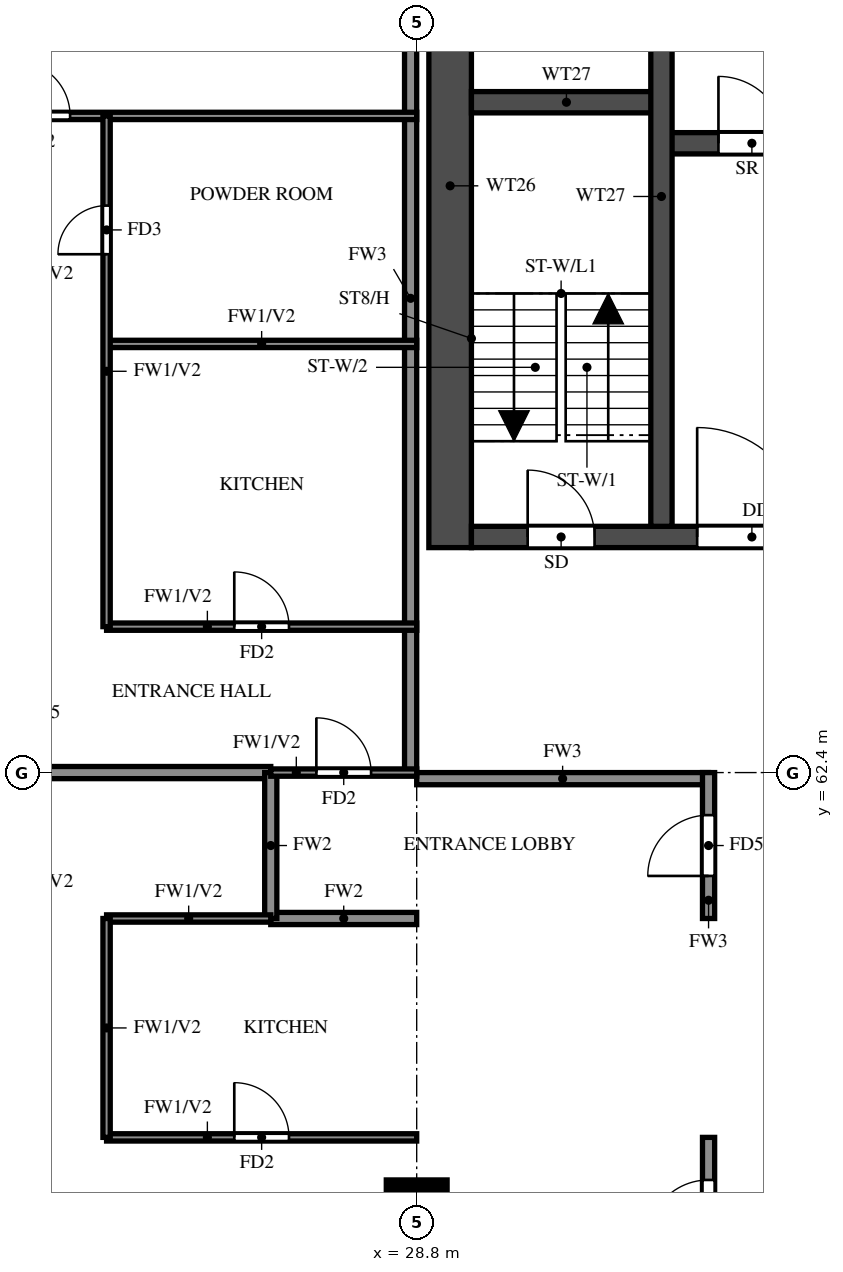
"""IFC4 building model, lengths in metres.
Left out: names, types, materials, properties, quantities, classifications, styles, units other than length and angle.
Written with IfcOpenShell. Run it as: python <this file> out.ifc"""

import sys

from ifc_helpers import new_model, si_unit, direction, frame, frame_2d, origin, origin_2d, place, context, subcontext, project, spatial, rectangle, extrude, source, transform, mapped, element, fill, save


model = new_model("IFC4")
c1 = context("Model", 3, precision=1e-05, world=origin(), true_north=direction((0.0, 1.0)))
c2 = subcontext(c1, "Body", "Model", "MODEL_VIEW")
j1 = project(units=[si_unit("LENGTHUNIT", "METRE"), si_unit("PLANEANGLEUNIT", "RADIAN")], contexts=[c1])
p1 = place(None, origin())
s1 = spatial("IfcSite", under=j1, at=p1, CompositionType="ELEMENT")
p2 = place(p1, origin())
s2 = spatial("IfcBuilding", under=s1, at=p2, CompositionType="ELEMENT")
p3 = place(p2, frame((0.0, 0.0, 164.0)))
s3 = spatial("IfcBuildingStorey", under=s2, at=p3, CompositionType="ELEMENT", Elevation=164.0)
m1 = source(origin(), c2, "Body", "SweptSolid", [
    extrude(rectangle(XDim=1.0, YDim=1.0, at=origin_2d()), origin(), (0.0, 0.0, 1.0), 3.2),
])
p4 = place(p3, frame((28.8, 55.2, 0.0), z_axis=(0.0, 0.0, 1.0), x_axis=(1.0, 0.0, 0.0)))
e1 = element("IfcColumn", 1, at=p4, inside=s3, PredefinedType="COLUMN", context=c2, shape_type="MappedRepresentation", body=[
    mapped(m1, transform((0.0, 0.0, 0.0))),
])
p5 = place(p3, frame((29.35, 66.1, 0.0), z_axis=(0.0, 0.0, 1.0), x_axis=(0.0, 1.0, 0.0)))
e2 = element("IfcWall", 2, at=p5, inside=s3, PredefinedType="SHEAR", context=c2, shape_type="SweptSolid", body=[
    extrude(rectangle(XDim=11.9, YDim=0.7, at=frame_2d((5.95, 0.0))), origin(), (0.0, 0.0, 1.0), 3.2),
])
p6 = place(p3, frame((29.7, 66.275, 0.0), z_axis=(0.0, 0.0, 1.0), x_axis=(1.0, 0.0, 0.0)))
e3 = element("IfcWall", 3, at=p6, inside=s3, PredefinedType="SHEAR", context=c2, shape_type="SweptSolid", body=[
    extrude(rectangle(XDim=41.4, YDim=0.35, at=frame_2d((20.7, 0.0))), origin(), (0.0, 0.0, 1.0), 3.2),
])
p7 = place(p6, frame((0.925, 0.0, 0.0)))
e4 = element("IfcOpeningElement", 4, at=p7, cuts=e3, PredefinedType="OPENING", context=c2, shape_type="SweptSolid", body=[
    extrude(rectangle(XDim=1.1, YDim=2.1, at=frame_2d((0.55, 1.05))), frame((0.0, 0.185, 0.0), z_axis=(0.0, -1.0, 0.0), x_axis=(1.0, 0.0, 0.0)), (0.0, 0.0, 1.0), 0.37),
])
p8 = place(p6, frame((3.712, 0.0, 0.0)))
e5 = element("IfcOpeningElement", 5, at=p8, cuts=e3, PredefinedType="OPENING", context=c2, shape_type="SweptSolid", body=[
    extrude(rectangle(XDim=1.8, YDim=2.1, at=frame_2d((0.9, 1.05))), frame((0.0, 0.185, 0.0), z_axis=(0.0, -1.0, 0.0), x_axis=(1.0, 0.0, 0.0)), (0.0, 0.0, 1.0), 0.37),
])
p9 = place(p3, frame((32.825, 72.75, 0.0), z_axis=(0.0, 0.0, 1.0), x_axis=(1.0, 0.0, 0.0)))
e6 = element("IfcWall", 6, at=p9, inside=s3, PredefinedType="SHEAR", context=c2, shape_type="SweptSolid", body=[
    extrude(rectangle(XDim=35.15, YDim=0.35, at=frame_2d((17.575, 0.0))), origin(), (0.0, 0.0, 1.0), 3.2),
])
p10 = place(p9, frame((19.8, 0.0, 0.0)))
e7 = element("IfcOpeningElement", 7, at=p10, cuts=e6, PredefinedType="OPENING", context=c2, shape_type="SweptSolid", body=[
    extrude(rectangle(XDim=1.1, YDim=2.1, at=frame_2d((0.55, 1.05))), frame((0.0, 0.185, 0.0), z_axis=(0.0, -1.0, 0.0), x_axis=(1.0, 0.0, 0.0)), (0.0, 0.0, 1.0), 0.37),
])
p11 = place(p9, frame((27.7, 0.0, 0.0)))
e8 = element("IfcOpeningElement", 8, at=p11, cuts=e6, PredefinedType="OPENING", context=c2, shape_type="SweptSolid", body=[
    extrude(rectangle(XDim=1.1, YDim=2.1, at=frame_2d((0.55, 1.05))), frame((0.0, 0.185, 0.0), z_axis=(0.0, -1.0, 0.0), x_axis=(1.0, 0.0, 0.0)), (0.0, 0.0, 1.0), 0.37),
])
p12 = place(p9, frame((30.3, 0.0, 0.0)))
e9 = element("IfcOpeningElement", 9, at=p12, cuts=e6, PredefinedType="OPENING", context=c2, shape_type="SweptSolid", body=[
    extrude(rectangle(XDim=1.1, YDim=2.1, at=frame_2d((0.55, 1.05))), frame((0.0, 0.185, 0.0), z_axis=(0.0, -1.0, 0.0), x_axis=(1.0, 0.0, 0.0)), (0.0, 0.0, 1.0), 0.37),
])
p13 = place(p9, frame((3.8, 0.0, 0.0)))
e10 = element("IfcOpeningElement", 10, at=p13, cuts=e6, PredefinedType="OPENING", context=c2, shape_type="SweptSolid", body=[
    extrude(rectangle(XDim=1.1, YDim=2.1, at=frame_2d((0.55, 1.05))), frame((0.0, 0.185, 0.0), z_axis=(0.0, -1.0, 0.0), x_axis=(1.0, 0.0, 0.0)), (0.0, 0.0, 1.0), 0.37),
])
p14 = place(p9, frame((6.55, 0.0, 0.0)))
e11 = element("IfcOpeningElement", 11, at=p14, cuts=e6, PredefinedType="OPENING", context=c2, shape_type="SweptSolid", body=[
    extrude(rectangle(XDim=1.1, YDim=2.1, at=frame_2d((0.55, 1.05))), frame((0.0, 0.185, 0.0), z_axis=(0.0, -1.0, 0.0), x_axis=(1.0, 0.0, 0.0)), (0.0, 0.0, 1.0), 0.37),
])
p15 = place(p9, frame((9.3, 0.0, 0.0)))
e12 = element("IfcOpeningElement", 12, at=p15, cuts=e6, PredefinedType="OPENING", context=c2, shape_type="SweptSolid", body=[
    extrude(rectangle(XDim=1.1, YDim=2.1, at=frame_2d((0.55, 1.05))), frame((0.0, 0.185, 0.0), z_axis=(0.0, -1.0, 0.0), x_axis=(1.0, 0.0, 0.0)), (0.0, 0.0, 1.0), 0.37),
])
p16 = place(p9, frame((12.05, 0.0, 0.0)))
e13 = element("IfcOpeningElement", 13, at=p16, cuts=e6, PredefinedType="OPENING", context=c2, shape_type="SweptSolid", body=[
    extrude(rectangle(XDim=1.1, YDim=2.1, at=frame_2d((0.55, 1.05))), frame((0.0, 0.185, 0.0), z_axis=(0.0, -1.0, 0.0), x_axis=(1.0, 0.0, 0.0)), (0.0, 0.0, 1.0), 0.37),
])
p17 = place(p9, frame((14.8, 0.0, 0.0)))
e14 = element("IfcOpeningElement", 14, at=p17, cuts=e6, PredefinedType="OPENING", context=c2, shape_type="SweptSolid", body=[
    extrude(rectangle(XDim=1.1, YDim=2.1, at=frame_2d((0.55, 1.05))), frame((0.0, 0.185, 0.0), z_axis=(0.0, -1.0, 0.0), x_axis=(1.0, 0.0, 0.0)), (0.0, 0.0, 1.0), 0.37),
])
p18 = place(p9, frame((17.55, 0.0, 0.0)))
e15 = element("IfcOpeningElement", 15, at=p18, cuts=e6, PredefinedType="OPENING", context=c2, shape_type="SweptSolid", body=[
    extrude(rectangle(XDim=1.1, YDim=2.1, at=frame_2d((0.55, 1.05))), frame((0.0, 0.185, 0.0), z_axis=(0.0, -1.0, 0.0), x_axis=(1.0, 0.0, 0.0)), (0.0, 0.0, 1.0), 0.37),
])
p19 = place(p9, frame((0.938, 0.0, 0.0)))
e16 = element("IfcOpeningElement", 16, at=p19, cuts=e6, PredefinedType="OPENING", context=c2, shape_type="SweptSolid", body=[
    extrude(rectangle(XDim=1.1, YDim=2.1, at=frame_2d((0.55, 1.05))), frame((0.0, 0.185, 0.0), z_axis=(0.0, -1.0, 0.0), x_axis=(1.0, 0.0, 0.0)), (0.0, 0.0, 1.0), 0.37),
])
p20 = place(p3, frame((29.7, 73.425, 0.0), z_axis=(0.0, 0.0, 1.0), x_axis=(1.0, 0.0, 0.0)))
e17 = element("IfcWall", 17, at=p20, inside=s3, PredefinedType="SHEAR", context=c2, shape_type="SweptSolid", body=[
    extrude(rectangle(XDim=3.125, YDim=0.35, at=frame_2d((1.562, 0.0))), origin(), (0.0, 0.0, 1.0), 3.2),
])
p21 = place(p3, frame((32.825, 66.45, 0.0), z_axis=(0.0, 0.0, 1.0), x_axis=(0.0, 1.0, 0.0)))
e18 = element("IfcWall", 18, at=p21, inside=s3, PredefinedType="SHEAR", context=c2, shape_type="SweptSolid", body=[
    extrude(rectangle(XDim=10.85, YDim=0.35, at=frame_2d((5.425, 0.0))), origin(), (0.0, 0.0, 1.0), 3.2),
])
p22 = place(p3, frame((28.8, 62.3, 0.0), z_axis=(0.0, 0.0, 1.0), x_axis=(1.0, 0.0, 0.0)))
e19 = element("IfcWall", 19, at=p22, inside=s3, PredefinedType="SOLIDWALL", context=c2, shape_type="SweptSolid", body=[
    extrude(rectangle(XDim=4.8, YDim=0.2, at=frame_2d((2.4, 0.0))), origin(), (0.0, 0.0, 1.0), 3.2),
])
p23 = place(p3, frame((28.7, 62.4, 0.0), z_axis=(0.0, 0.0, 1.0), x_axis=(0.0, 1.0, 0.0)))
e20 = element("IfcWall", 20, at=p23, inside=s3, PredefinedType="SOLIDWALL", context=c2, shape_type="SweptSolid", body=[
    extrude(rectangle(XDim=15.6, YDim=0.2, at=frame_2d((7.8, 0.0))), origin(), (0.0, 0.0, 1.0), 3.2),
])
p24 = place(p3, frame((33.6, 45.6, 0.0), z_axis=(0.0, 0.0, 1.0), x_axis=(0.0, 1.0, 0.0)))
e21 = element("IfcWall", 21, at=p24, inside=s3, PredefinedType="SOLIDWALL", context=c2, shape_type="SweptSolid", body=[
    extrude(rectangle(XDim=10.8, YDim=0.2, at=frame_2d((5.4, 0.0))), origin(), (0.0, 0.0, 1.0), 3.2),
])
p25 = place(p24, frame((0.7, 0.0, 0.0)))
e22 = element("IfcOpeningElement", 22, at=p25, cuts=e21, PredefinedType="OPENING", context=c2, shape_type="SweptSolid", body=[
    extrude(rectangle(XDim=1.0, YDim=2.1, at=frame_2d((0.5, 1.05))), frame((0.0, 0.11, 0.0), z_axis=(0.0, -1.0, 0.0), x_axis=(1.0, 0.0, 0.0)), (0.0, 0.0, 1.0), 0.22),
])
p26 = place(p24, frame((9.1, 0.0, 0.0)))
e23 = element("IfcOpeningElement", 23, at=p26, cuts=e21, PredefinedType="OPENING", context=c2, shape_type="SweptSolid", body=[
    extrude(rectangle(XDim=1.0, YDim=2.1, at=frame_2d((0.5, 1.05))), frame((0.0, 0.11, 0.0), z_axis=(0.0, -1.0, 0.0), x_axis=(1.0, 0.0, 0.0)), (0.0, 0.0, 1.0), 0.22),
])
p27 = place(p3, frame((33.6, 60.0, 0.0), z_axis=(0.0, 0.0, 1.0), x_axis=(0.0, 1.0, 0.0)))
e24 = element("IfcWall", 24, at=p27, inside=s3, PredefinedType="SOLIDWALL", context=c2, shape_type="SweptSolid", body=[
    extrude(rectangle(XDim=2.4, YDim=0.2, at=frame_2d((1.2, 0.0))), origin(), (0.0, 0.0, 1.0), 3.2),
])
p28 = place(p27, frame((0.7, 0.0, 0.0)))
e25 = element("IfcOpeningElement", 25, at=p28, cuts=e24, PredefinedType="OPENING", context=c2, shape_type="SweptSolid", body=[
    extrude(rectangle(XDim=1.0, YDim=2.1, at=frame_2d((0.5, 1.05))), frame((0.0, 0.11, 0.0), z_axis=(0.0, -1.0, 0.0), x_axis=(1.0, 0.0, 0.0)), (0.0, 0.0, 1.0), 0.22),
])
p29 = place(p3, frame((26.4, 60.0, 0.0), z_axis=(0.0, 0.0, 1.0), x_axis=(1.0, 0.0, 0.0)))
e26 = element("IfcWall", 26, at=p29, inside=s3, PredefinedType="SOLIDWALL", context=c2, shape_type="SweptSolid", body=[
    extrude(rectangle(XDim=2.4, YDim=0.2, at=frame_2d((1.2, 0.0))), origin(), (0.0, 0.0, 1.0), 3.2),
])
p30 = place(p3, frame((14.525, 62.4, 0.0), z_axis=(0.0, 0.0, 1.0), x_axis=(1.0, 0.0, 0.0)))
e27 = element("IfcWall", 27, at=p30, inside=s3, PredefinedType="SOLIDWALL", context=c2, shape_type="SweptSolid", body=[
    extrude(rectangle(XDim=11.875, YDim=0.2, at=frame_2d((5.938, 0.0))), origin(), (0.0, 0.0, 1.0), 3.2),
])
p31 = place(p3, frame((26.4, 60.0, 0.0), z_axis=(0.0, 0.0, 1.0), x_axis=(0.0, 1.0, 0.0)))
e28 = element("IfcWall", 28, at=p31, inside=s3, PredefinedType="SOLIDWALL", context=c2, shape_type="SweptSolid", body=[
    extrude(rectangle(XDim=2.4, YDim=0.2, at=frame_2d((1.2, 0.0))), origin(), (0.0, 0.0, 1.0), 3.2),
])
p32 = place(p3, frame((23.7, 56.4, 0.0), z_axis=(0.0, 0.0, 1.0), x_axis=(1.0, 0.0, 0.0)))
e29 = element("IfcWall", 29, at=p32, inside=s3, PredefinedType="PARTITIONING", context=c2, shape_type="SweptSolid", body=[
    extrude(rectangle(XDim=5.1, YDim=0.12, at=frame_2d((2.55, 0.0))), origin(), (0.0, 0.0, 1.0), 3.2),
])
p33 = place(p32, frame((2.1, 0.0, 0.0)))
e30 = element("IfcOpeningElement", 30, at=p33, cuts=e29, PredefinedType="OPENING", context=c2, shape_type="SweptSolid", body=[
    extrude(rectangle(XDim=0.9, YDim=2.1, at=frame_2d((0.45, 1.05))), frame((0.0, 0.07, 0.0), z_axis=(0.0, -1.0, 0.0), x_axis=(1.0, 0.0, 0.0)), (0.0, 0.0, 1.0), 0.14),
])
p34 = place(p3, frame((23.7, 60.0, 0.0), z_axis=(0.0, 0.0, 1.0), x_axis=(1.0, 0.0, 0.0)))
e31 = element("IfcWall", 31, at=p34, inside=s3, PredefinedType="PARTITIONING", context=c2, shape_type="SweptSolid", body=[
    extrude(rectangle(XDim=2.7, YDim=0.12, at=frame_2d((1.35, 0.0))), origin(), (0.0, 0.0, 1.0), 3.2),
])
p35 = place(p3, frame((26.4, 62.4, 0.0), z_axis=(0.0, 0.0, 1.0), x_axis=(1.0, 0.0, 0.0)))
e32 = element("IfcWall", 32, at=p35, inside=s3, PredefinedType="PARTITIONING", context=c2, shape_type="SweptSolid", body=[
    extrude(rectangle(XDim=2.4, YDim=0.12, at=frame_2d((1.2, 0.0))), origin(), (0.0, 0.0, 1.0), 3.2),
])
p36 = place(p35, frame((0.75, 0.0, 0.0)))
e33 = element("IfcOpeningElement", 33, at=p36, cuts=e32, PredefinedType="OPENING", context=c2, shape_type="SweptSolid", body=[
    extrude(rectangle(XDim=0.9, YDim=2.1, at=frame_2d((0.45, 1.05))), frame((0.0, 0.07, 0.0), z_axis=(0.0, -1.0, 0.0), x_axis=(1.0, 0.0, 0.0)), (0.0, 0.0, 1.0), 0.14),
])
p37 = place(p3, frame((23.7, 64.8, 0.0), z_axis=(0.0, 0.0, 1.0), x_axis=(1.0, 0.0, 0.0)))
e34 = element("IfcWall", 34, at=p37, inside=s3, PredefinedType="PARTITIONING", context=c2, shape_type="SweptSolid", body=[
    extrude(rectangle(XDim=5.1, YDim=0.12, at=frame_2d((2.55, 0.0))), origin(), (0.0, 0.0, 1.0), 3.2),
])
p38 = place(p37, frame((2.1, 0.0, 0.0)))
e35 = element("IfcOpeningElement", 35, at=p38, cuts=e34, PredefinedType="OPENING", context=c2, shape_type="SweptSolid", body=[
    extrude(rectangle(XDim=0.9, YDim=2.1, at=frame_2d((0.45, 1.05))), frame((0.0, 0.07, 0.0), z_axis=(0.0, -1.0, 0.0), x_axis=(1.0, 0.0, 0.0)), (0.0, 0.0, 1.0), 0.14),
])
p39 = place(p3, frame((23.7, 69.45, 0.0), z_axis=(0.0, 0.0, 1.0), x_axis=(1.0, 0.0, 0.0)))
e36 = element("IfcWall", 36, at=p39, inside=s3, PredefinedType="PARTITIONING", context=c2, shape_type="SweptSolid", body=[
    extrude(rectangle(XDim=5.1, YDim=0.12, at=frame_2d((2.55, 0.0))), origin(), (0.0, 0.0, 1.0), 3.2),
])
p40 = place(p3, frame((14.525, 73.2, 0.0), z_axis=(0.0, 0.0, 1.0), x_axis=(1.0, 0.0, 0.0)))
e37 = element("IfcWall", 37, at=p40, inside=s3, PredefinedType="PARTITIONING", context=c2, shape_type="SweptSolid", body=[
    extrude(rectangle(XDim=14.275, YDim=0.12, at=frame_2d((7.138, 0.0))), origin(), (0.0, 0.0, 1.0), 2.3),
])
p41 = place(p40, frame((7.675, 0.0, 0.0)))
e38 = element("IfcOpeningElement", 38, at=p41, cuts=e37, PredefinedType="OPENING", context=c2, shape_type="SweptSolid", body=[
    extrude(rectangle(XDim=0.9, YDim=2.1, at=frame_2d((0.45, 1.05))), frame((0.0, 0.07, 0.0), z_axis=(0.0, -1.0, 0.0), x_axis=(1.0, 0.0, 0.0)), (0.0, 0.0, 1.0), 0.14),
])
p42 = place(p3, frame((23.7, 56.4, 0.0), z_axis=(0.0, 0.0, 1.0), x_axis=(0.0, 1.0, 0.0)))
e39 = element("IfcWall", 39, at=p42, inside=s3, PredefinedType="PARTITIONING", context=c2, shape_type="SweptSolid", body=[
    extrude(rectangle(XDim=3.6, YDim=0.12, at=frame_2d((1.8, 0.0))), origin(), (0.0, 0.0, 1.0), 3.2),
])
p43 = place(p3, frame((23.7, 64.8, 0.0), z_axis=(0.0, 0.0, 1.0), x_axis=(0.0, 1.0, 0.0)))
e40 = element("IfcWall", 40, at=p43, inside=s3, PredefinedType="PARTITIONING", context=c2, shape_type="SweptSolid", body=[
    extrude(rectangle(XDim=8.4, YDim=0.12, at=frame_2d((4.2, 0.0))), origin(), (0.0, 0.0, 1.0), 3.2),
])
p44 = place(p43, frame((6.125, 0.0, 0.0)))
e41 = element("IfcOpeningElement", 41, at=p44, cuts=e40, PredefinedType="OPENING", context=c2, shape_type="SweptSolid", body=[
    extrude(rectangle(XDim=0.8, YDim=2.1, at=frame_2d((0.4, 1.05))), frame((0.0, 0.07, 0.0), z_axis=(0.0, -1.0, 0.0), x_axis=(1.0, 0.0, 0.0)), (0.0, 0.0, 1.0), 0.14),
])
p45 = place(p7, origin())
e42 = element("IfcDoor", 42, at=p45, inside=s3, OperationType="SINGLE_SWING_LEFT", PredefinedType="DOOR", context=c2, shape_type="SweptSolid", body=[
    extrude(rectangle(XDim=1.1, YDim=2.1, at=frame_2d((0.55, 1.05))), frame((0.0, 0.025, 0.0), z_axis=(0.0, -1.0, 0.0), x_axis=(1.0, 0.0, 0.0)), (0.0, 0.0, 1.0), 0.05),
])
fill(e4, e42)
p46 = place(p8, origin())
e43 = element("IfcDoor", 43, at=p46, inside=s3, OperationType="DOUBLE_DOOR_SINGLE_SWING", PredefinedType="DOOR", context=c2, shape_type="SweptSolid", body=[
    extrude(rectangle(XDim=1.8, YDim=2.1, at=frame_2d((0.9, 1.05))), frame((0.0, 0.025, 0.0), z_axis=(0.0, -1.0, 0.0), x_axis=(1.0, 0.0, 0.0)), (0.0, 0.0, 1.0), 0.05),
])
fill(e5, e43)
p47 = place(p19, origin())
e44 = element("IfcDoor", 44, at=p47, inside=s3, OperationType="SINGLE_SWING_LEFT", PredefinedType="DOOR", context=c2, shape_type="SweptSolid", body=[
    extrude(rectangle(XDim=1.1, YDim=2.1, at=frame_2d((0.55, 1.05))), frame((0.0, 0.025, 0.0), z_axis=(0.0, -1.0, 0.0), x_axis=(1.0, 0.0, 0.0)), (0.0, 0.0, 1.0), 0.05),
])
fill(e16, e44)
p48 = place(p26, origin())
e45 = element("IfcDoor", 45, at=p48, inside=s3, OperationType="SINGLE_SWING_LEFT", PredefinedType="DOOR", context=c2, shape_type="SweptSolid", body=[
    extrude(rectangle(XDim=1.0, YDim=2.1, at=frame_2d((0.5, 1.05))), frame((0.0, 0.025, 0.0), z_axis=(0.0, -1.0, 0.0), x_axis=(1.0, 0.0, 0.0)), (0.0, 0.0, 1.0), 0.05),
])
fill(e23, e45)
p49 = place(p33, origin())
e46 = element("IfcDoor", 46, at=p49, inside=s3, OperationType="SINGLE_SWING_LEFT", PredefinedType="DOOR", context=c2, shape_type="SweptSolid", body=[
    extrude(rectangle(XDim=0.9, YDim=2.1, at=frame_2d((0.45, 1.05))), frame((0.0, 0.025, 0.0), z_axis=(0.0, -1.0, 0.0), x_axis=(1.0, 0.0, 0.0)), (0.0, 0.0, 1.0), 0.05),
])
fill(e30, e46)
p50 = place(p36, origin())
e47 = element("IfcDoor", 47, at=p50, inside=s3, OperationType="SINGLE_SWING_LEFT", PredefinedType="DOOR", context=c2, shape_type="SweptSolid", body=[
    extrude(rectangle(XDim=0.9, YDim=2.1, at=frame_2d((0.45, 1.05))), frame((0.0, 0.025, 0.0), z_axis=(0.0, -1.0, 0.0), x_axis=(1.0, 0.0, 0.0)), (0.0, 0.0, 1.0), 0.05),
])
fill(e33, e47)
p51 = place(p28, origin())
e48 = element("IfcDoor", 48, at=p51, inside=s3, OperationType="SINGLE_SWING_LEFT", PredefinedType="DOOR", context=c2, shape_type="SweptSolid", body=[
    extrude(rectangle(XDim=1.0, YDim=2.1, at=frame_2d((0.5, 1.05))), frame((0.0, 0.025, 0.0), z_axis=(0.0, -1.0, 0.0), x_axis=(1.0, 0.0, 0.0)), (0.0, 0.0, 1.0), 0.05),
])
fill(e25, e48)
p52 = place(p41, origin())
e49 = element("IfcDoor", 49, at=p52, inside=s3, OperationType="SINGLE_SWING_RIGHT", PredefinedType="DOOR", context=c2, shape_type="SweptSolid", body=[
    extrude(rectangle(XDim=0.9, YDim=2.1, at=frame_2d((0.45, 1.05))), frame((0.0, 0.025, 0.0), z_axis=(0.0, -1.0, 0.0), x_axis=(1.0, 0.0, 0.0)), (0.0, 0.0, 1.0), 0.05),
])
fill(e38, e49)
p53 = place(p38, origin())
e50 = element("IfcDoor", 50, at=p53, inside=s3, OperationType="SINGLE_SWING_LEFT", PredefinedType="DOOR", context=c2, shape_type="SweptSolid", body=[
    extrude(rectangle(XDim=0.9, YDim=2.1, at=frame_2d((0.45, 1.05))), frame((0.0, 0.025, 0.0), z_axis=(0.0, -1.0, 0.0), x_axis=(1.0, 0.0, 0.0)), (0.0, 0.0, 1.0), 0.05),
])
fill(e35, e50)
p54 = place(p44, origin())
e51 = element("IfcDoor", 51, at=p54, inside=s3, OperationType="SINGLE_SWING_LEFT", PredefinedType="DOOR", context=c2, shape_type="SweptSolid", body=[
    extrude(rectangle(XDim=0.8, YDim=2.1, at=frame_2d((0.4, 1.05))), frame((0.0, 0.025, 0.0), z_axis=(0.0, -1.0, 0.0), x_axis=(1.0, 0.0, 0.0)), (0.0, 0.0, 1.0), 0.05),
])
fill(e41, e51)
save(model, sys.argv[1])
